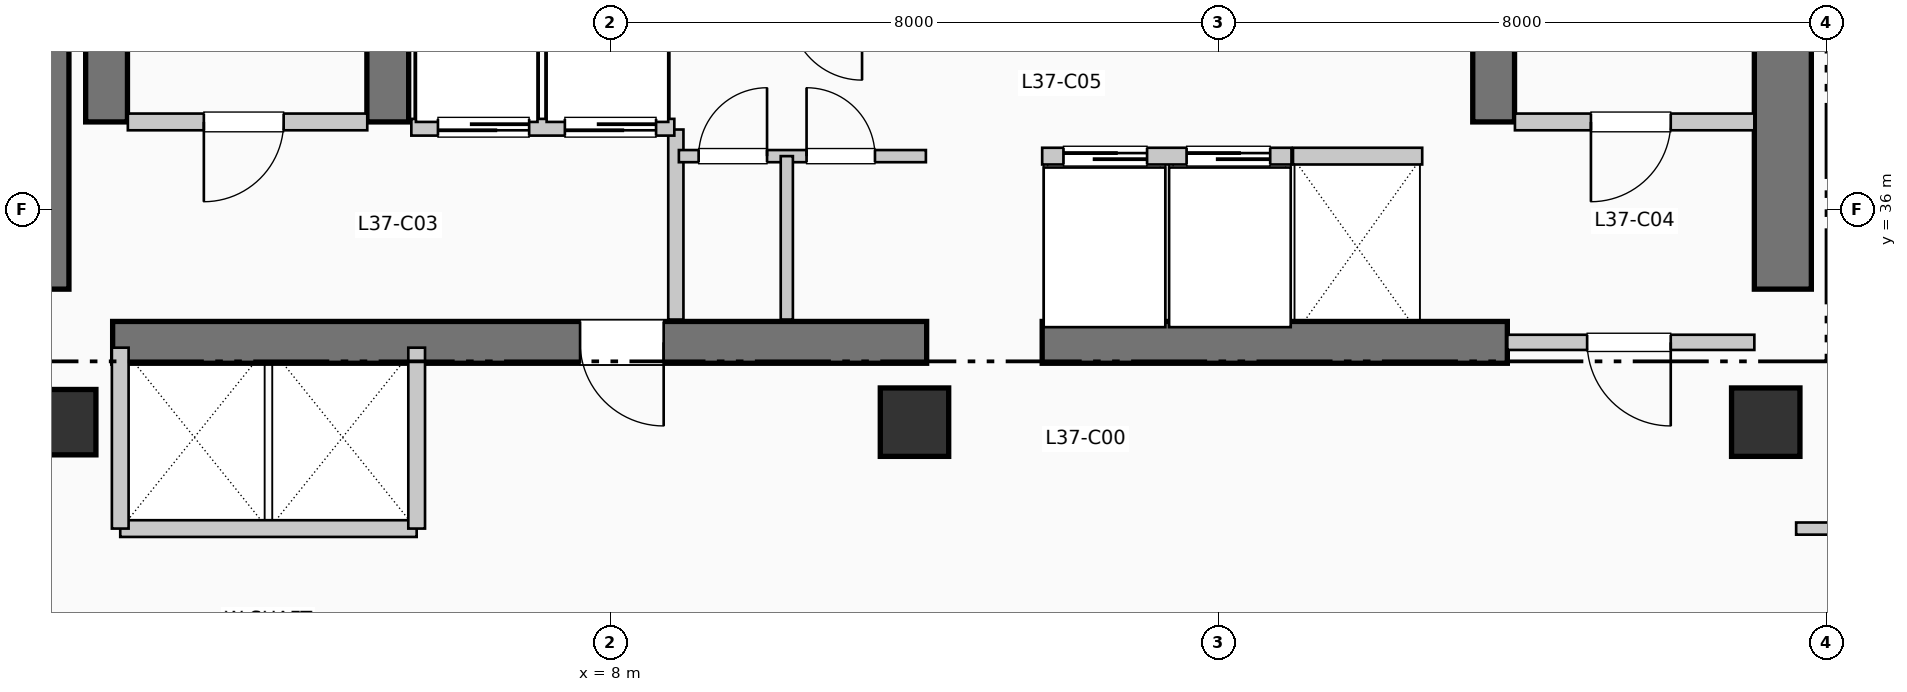
"""IFC4 building model, lengths in metres.
Left out: names, types, materials, properties, quantities, classifications, styles, units other than length and angle.
Written with IfcOpenShell. Run it as: python <this file> out.ifc"""

import sys

from ifc_helpers import new_model, si_unit, direction, frame, frame_2d, origin, origin_2d, place, context, subcontext, project, spatial, rectangle, extrude, element, fill, save


model = new_model("IFC4")
c1 = context("Model", 3, precision=1e-05, world=origin(), true_north=direction((0.0, 1.0)))
c2 = subcontext(c1, "Body", "Model", "MODEL_VIEW")
j1 = project(units=[si_unit("LENGTHUNIT", "METRE"), si_unit("PLANEANGLEUNIT", "RADIAN")], contexts=[c1])
p1 = place(None, origin())
s1 = spatial("IfcSite", under=j1, at=p1, CompositionType="ELEMENT")
p2 = place(p1, origin())
s2 = spatial("IfcBuilding", under=s1, at=p2, CompositionType="ELEMENT")
p3 = place(p2, frame((0.0, 0.0, 154.77)))
s3 = spatial("IfcBuildingStorey", under=s2, at=p3, CompositionType="ELEMENT", Elevation=154.77)
p4 = place(p3, frame((0.5, 34.95, 0.0), z_axis=(0.0, 0.0, 1.0), x_axis=(0.0, 1.0, 0.0)))
e1 = element("IfcWall", 1, at=p4, inside=s3, PredefinedType="SHEAR", context=c2, shape_type="SweptSolid", body=[
    extrude(rectangle(XDim=7.9, YDim=0.75, at=frame_2d((3.95, 0.0))), origin(), (0.0, 0.0, 1.0), 3.96),
])
p5 = place(p3, frame((23.425, 34.95, 0.0), z_axis=(0.0, 0.0, 1.0), x_axis=(0.0, 1.0, 0.0)))
e2 = element("IfcWall", 2, at=p5, inside=s3, PredefinedType="SHEAR", context=c2, shape_type="SweptSolid", body=[
    extrude(rectangle(XDim=10.64, YDim=0.75, at=frame_2d((5.32, 0.0))), origin(), (0.0, 0.0, 1.0), 3.96),
])
p6 = place(p3, frame((1.45, 34.25, 0.0), z_axis=(0.0, 0.0, 1.0), x_axis=(1.0, 0.0, 0.0)))
e3 = element("IfcWall", 3, at=p6, inside=s3, PredefinedType="SHEAR", context=c2, shape_type="SweptSolid", body=[
    extrude(rectangle(XDim=10.71, YDim=0.55, at=frame_2d((5.355, 0.0))), origin(), (0.0, 0.0, 1.0), 3.96),
])
p7 = place(p6, frame((7.25, 0.0, 0.0), z_axis=(0.0, 0.0, 1.0), x_axis=(-1.0, 0.0, 0.0)))
e4 = element("IfcOpeningElement", 4, at=p7, cuts=e3, PredefinedType="OPENING", context=c2, shape_type="SweptSolid", body=[
    extrude(rectangle(XDim=1.1, YDim=2.15, at=frame_2d((0.55, 1.075))), frame((0.0, 0.285, 0.0), z_axis=(0.0, -1.0, 0.0), x_axis=(1.0, 0.0, 0.0)), (0.0, 0.0, 1.0), 0.57),
])
p8 = place(p3, frame((13.68, 34.25, 0.0), z_axis=(0.0, 0.0, 1.0), x_axis=(1.0, 0.0, 0.0)))
e5 = element("IfcWall", 5, at=p8, inside=s3, PredefinedType="SHEAR", context=c2, shape_type="SweptSolid", body=[
    extrude(rectangle(XDim=6.12, YDim=0.55, at=frame_2d((3.06, 0.0))), origin(), (0.0, 0.0, 1.0), 3.96),
])
for number, where, z_axis, x_axis in (
    (6, (1.37, 37.15, 0.0), (0.0, 0.0, 1.0), (0.0, 1.0, 0.0)),
    (7, (5.07, 37.15, 0.0), (0.0, 0.0, 1.0), (0.0, 1.0, 0.0)),
    (8, (19.62, 37.15, 0.0), (0.0, 0.0, 1.0), (0.0, 1.0, 0.0)),
):
    element("IfcWall", number, at=place(p3, frame(where, z_axis=z_axis, x_axis=x_axis)), inside=s3, PredefinedType="SHEAR", context=c2, shape_type="SweptSolid", body=[
        extrude(rectangle(XDim=7.89, YDim=0.55, at=frame_2d((3.945, 0.0))), origin(), (0.0, 0.0, 1.0), 3.96),
    ])
p9 = place(p3, frame((0.8, 33.2, 0.0), z_axis=(0.0, 0.0, 1.0), x_axis=(1.0, 0.0, 0.0)))
e9 = element("IfcColumn", 9, at=p9, inside=s3, PredefinedType="COLUMN", context=c2, shape_type="SweptSolid", body=[
    extrude(rectangle(XDim=0.86, YDim=0.86, at=origin_2d()), origin(), (0.0, 0.0, 1.0), 3.96),
])
for number, where, z_axis, x_axis in (
    (10, (12.0, 33.2, 0.0), (0.0, 0.0, 1.0), (1.0, 0.0, 0.0)),
    (11, (23.2, 33.2, 0.0), (0.0, 0.0, 1.0), (1.0, 0.0, 0.0)),
):
    element("IfcColumn", number, at=place(p3, frame(where, z_axis=z_axis, x_axis=x_axis)), inside=s3, PredefinedType="COLUMN", context=c2, shape_type="SweptSolid", body=[
        extrude(rectangle(XDim=0.9, YDim=0.9, at=origin_2d()), origin(), (0.0, 0.0, 1.0), 3.96),
    ])
p10 = place(p3, frame((1.65, 37.15, 0.0), z_axis=(0.0, 0.0, 1.0), x_axis=(1.0, 0.0, 0.0)))
e12 = element("IfcWall", 12, at=p10, inside=s3, PredefinedType="PARTITIONING", context=c2, shape_type="SweptSolid", body=[
    extrude(rectangle(XDim=3.15, YDim=0.22, at=frame_2d((1.575, 0.0))), origin(), (0.0, 0.0, 1.0), 3.71),
])
p11 = place(p10, frame((2.05, 0.0, 0.0), z_axis=(0.0, 0.0, 1.0), x_axis=(-1.0, 0.0, 0.0)))
e13 = element("IfcOpeningElement", 13, at=p11, cuts=e12, PredefinedType="OPENING", context=c2, shape_type="SweptSolid", body=[
    extrude(rectangle(XDim=1.05, YDim=2.15, at=frame_2d((0.525, 1.075))), frame((0.0, 0.12, 0.0), z_axis=(0.0, -1.0, 0.0), x_axis=(1.0, 0.0, 0.0)), (0.0, 0.0, 1.0), 0.24),
])
p12 = place(p3, frame((8.86, 34.55, 0.0), z_axis=(0.0, 0.0, 1.0), x_axis=(0.0, 1.0, 0.0)))
e14 = element("IfcWall", 14, at=p12, inside=s3, PredefinedType="PARTITIONING", context=c2, shape_type="SweptSolid", body=[
    extrude(rectangle(XDim=2.5, YDim=0.2, at=frame_2d((1.25, 0.0))), origin(), (0.0, 0.0, 1.0), 3.71),
])
p13 = place(p3, frame((19.9, 37.15, 0.0), z_axis=(0.0, 0.0, 1.0), x_axis=(1.0, 0.0, 0.0)))
e15 = element("IfcWall", 15, at=p13, inside=s3, PredefinedType="PARTITIONING", context=c2, shape_type="SweptSolid", body=[
    extrude(rectangle(XDim=3.15, YDim=0.22, at=frame_2d((1.575, 0.0))), origin(), (0.0, 0.0, 1.0), 3.71),
])
p14 = place(p13, frame((2.05, 0.0, 0.0), z_axis=(0.0, 0.0, 1.0), x_axis=(-1.0, 0.0, 0.0)))
e16 = element("IfcOpeningElement", 16, at=p14, cuts=e15, PredefinedType="OPENING", context=c2, shape_type="SweptSolid", body=[
    extrude(rectangle(XDim=1.05, YDim=2.15, at=frame_2d((0.525, 1.075))), frame((0.0, 0.12, 0.0), z_axis=(0.0, -1.0, 0.0), x_axis=(1.0, 0.0, 0.0)), (0.0, 0.0, 1.0), 0.24),
])
p15 = place(p3, frame((19.8, 34.25, 0.0), z_axis=(0.0, 0.0, 1.0), x_axis=(1.0, 0.0, 0.0)))
e17 = element("IfcWall", 17, at=p15, inside=s3, PredefinedType="PARTITIONING", context=c2, shape_type="SweptSolid", body=[
    extrude(rectangle(XDim=3.25, YDim=0.2, at=frame_2d((1.625, 0.0))), origin(), (0.0, 0.0, 1.0), 3.71),
])
p16 = place(p15, frame((2.15, 0.0, 0.0), z_axis=(0.0, 0.0, 1.0), x_axis=(-1.0, 0.0, 0.0)))
e18 = element("IfcOpeningElement", 18, at=p16, cuts=e17, PredefinedType="OPENING", context=c2, shape_type="SweptSolid", body=[
    extrude(rectangle(XDim=1.1, YDim=2.15, at=frame_2d((0.55, 1.075))), frame((0.0, 0.11, 0.0), z_axis=(0.0, -1.0, 0.0), x_axis=(1.0, 0.0, 0.0)), (0.0, 0.0, 1.0), 0.22),
])
p17 = place(p3, frame((5.38, 37.08, 0.0), z_axis=(0.0, 0.0, 1.0), x_axis=(1.0, 0.0, 0.0)))
e19 = element("IfcWall", 19, at=p17, inside=s3, PredefinedType="PARTITIONING", context=c2, shape_type="SweptSolid", body=[
    extrude(rectangle(XDim=3.46, YDim=0.22, at=frame_2d((1.73, 0.0))), origin(), (0.0, 0.0, 1.0), 3.71),
])
p18 = place(p17, frame((1.55, 0.0, 0.0), z_axis=(0.0, 0.0, 1.0), x_axis=(-1.0, 0.0, 0.0)))
e20 = element("IfcOpeningElement", 20, at=p18, cuts=e19, PredefinedType="OPENING", context=c2, shape_type="SweptSolid", body=[
    extrude(rectangle(XDim=1.2, YDim=2.2, at=frame_2d((0.6, 1.1))), frame((0.0, 0.12, 0.0), z_axis=(0.0, -1.0, 0.0), x_axis=(1.0, 0.0, 0.0)), (0.0, 0.0, 1.0), 0.24),
])
p19 = place(p17, frame((3.22, 0.0, 0.0), z_axis=(0.0, 0.0, 1.0), x_axis=(-1.0, 0.0, 0.0)))
e21 = element("IfcOpeningElement", 21, at=p19, cuts=e19, PredefinedType="OPENING", context=c2, shape_type="SweptSolid", body=[
    extrude(rectangle(XDim=1.2, YDim=2.2, at=frame_2d((0.6, 1.1))), frame((0.0, 0.12, 0.0), z_axis=(0.0, -1.0, 0.0), x_axis=(1.0, 0.0, 0.0)), (0.0, 0.0, 1.0), 0.24),
])
p20 = place(p3, frame((1.55, 31.8, 0.0), z_axis=(0.0, 0.0, 1.0), x_axis=(1.0, 0.0, 0.0)))
e22 = element("IfcWall", 22, at=p20, inside=s3, PredefinedType="PARTITIONING", context=c2, shape_type="SweptSolid", body=[
    extrude(rectangle(XDim=3.9, YDim=0.22, at=frame_2d((1.95, 0.0))), origin(), (0.0, 0.0, 1.0), 3.71),
])
for number, where, z_axis, x_axis in (
    (23, (1.55, 31.8, 0.0), (0.0, 0.0, 1.0), (0.0, 1.0, 0.0)),
    (24, (5.45, 31.8, 0.0), (0.0, 0.0, 1.0), (0.0, 1.0, 0.0)),
):
    element("IfcWall", number, at=place(p3, frame(where, z_axis=z_axis, x_axis=x_axis)), inside=s3, PredefinedType="PARTITIONING", context=c2, shape_type="SweptSolid", body=[
        extrude(rectangle(XDim=2.38, YDim=0.22, at=frame_2d((1.19, 0.0))), origin(), (0.0, 0.0, 1.0), 3.71),
    ])
p21 = place(p3, frame((8.9, 36.7, 0.0), z_axis=(0.0, 0.0, 1.0), x_axis=(1.0, 0.0, 0.0)))
e25 = element("IfcWall", 25, at=p21, inside=s3, PredefinedType="PARTITIONING", context=c2, shape_type="SweptSolid", body=[
    extrude(rectangle(XDim=3.25, YDim=0.16, at=frame_2d((1.625, 0.0))), origin(), (0.0, 0.0, 1.0), 3.71),
])
p22 = place(p21, frame((0.26, 0.0, 0.0)))
e26 = element("IfcOpeningElement", 26, at=p22, cuts=e25, PredefinedType="OPENING", context=c2, shape_type="SweptSolid", body=[
    extrude(rectangle(XDim=0.9, YDim=2.15, at=frame_2d((0.45, 1.075))), frame((0.0, 0.09, 0.0), z_axis=(0.0, -1.0, 0.0), x_axis=(1.0, 0.0, 0.0)), (0.0, 0.0, 1.0), 0.18),
])
p23 = place(p21, frame((1.68, 0.0, 0.0)))
e27 = element("IfcOpeningElement", 27, at=p23, cuts=e25, PredefinedType="OPENING", context=c2, shape_type="SweptSolid", body=[
    extrude(rectangle(XDim=0.9, YDim=2.15, at=frame_2d((0.45, 1.075))), frame((0.0, 0.09, 0.0), z_axis=(0.0, -1.0, 0.0), x_axis=(1.0, 0.0, 0.0)), (0.0, 0.0, 1.0), 0.18),
])
p24 = place(p3, frame((10.32, 34.55, 0.0), z_axis=(0.0, 0.0, 1.0), x_axis=(0.0, 1.0, 0.0)))
e28 = element("IfcWall", 28, at=p24, inside=s3, PredefinedType="PARTITIONING", context=c2, shape_type="SweptSolid", body=[
    extrude(rectangle(XDim=2.15, YDim=0.16, at=frame_2d((1.075, 0.0))), origin(), (0.0, 0.0, 1.0), 3.71),
])
p25 = place(p3, frame((13.68, 36.7, 0.0), z_axis=(0.0, 0.0, 1.0), x_axis=(1.0, 0.0, 0.0)))
e29 = element("IfcWall", 29, at=p25, inside=s3, PredefinedType="PARTITIONING", context=c2, shape_type="SweptSolid", body=[
    extrude(rectangle(XDim=3.28, YDim=0.22, at=frame_2d((1.64, 0.0))), origin(), (0.0, 0.0, 1.0), 3.71),
])
p26 = place(p25, frame((0.28, 0.0, 0.0)))
e30 = element("IfcOpeningElement", 30, at=p26, cuts=e29, PredefinedType="OPENING", context=c2, shape_type="SweptSolid", body=[
    extrude(rectangle(XDim=1.1, YDim=2.2, at=frame_2d((0.55, 1.1))), frame((0.0, 0.12, 0.0), z_axis=(0.0, -1.0, 0.0), x_axis=(1.0, 0.0, 0.0)), (0.0, 0.0, 1.0), 0.24),
])
p27 = place(p25, frame((1.9, 0.0, 0.0)))
e31 = element("IfcOpeningElement", 31, at=p27, cuts=e29, PredefinedType="OPENING", context=c2, shape_type="SweptSolid", body=[
    extrude(rectangle(XDim=1.1, YDim=2.2, at=frame_2d((0.55, 1.1))), frame((0.0, 0.12, 0.0), z_axis=(0.0, -1.0, 0.0), x_axis=(1.0, 0.0, 0.0)), (0.0, 0.0, 1.0), 0.24),
])
p28 = place(p3, frame((16.98, 36.7, 0.0), z_axis=(0.0, 0.0, 1.0), x_axis=(1.0, 0.0, 0.0)))
e32 = element("IfcWall", 32, at=p28, inside=s3, PredefinedType="PARTITIONING", context=c2, shape_type="SweptSolid", body=[
    extrude(rectangle(XDim=1.7, YDim=0.22, at=frame_2d((0.85, 0.0))), origin(), (0.0, 0.0, 1.0), 3.71),
])
p29 = place(p3, frame((23.6, 31.8, 0.0), z_axis=(0.0, 0.0, 1.0), x_axis=(1.0, 0.0, 0.0)))
e33 = element("IfcWall", 33, at=p29, inside=s3, PredefinedType="PARTITIONING", context=c2, shape_type="SweptSolid", body=[
    extrude(rectangle(XDim=26.41, YDim=0.16, at=frame_2d((13.205, 0.0))), origin(), (0.0, 0.0, 1.0), 3.71),
])
p30 = place(p29, frame((4.015, 0.0, 0.0)))
e34 = element("IfcOpeningElement", 34, at=p30, cuts=e33, PredefinedType="OPENING", context=c2, shape_type="SweptSolid", body=[
    extrude(rectangle(XDim=0.95, YDim=2.15, at=frame_2d((0.475, 1.075))), frame((0.0, 0.09, 0.0), z_axis=(0.0, -1.0, 0.0), x_axis=(1.0, 0.0, 0.0)), (0.0, 0.0, 1.0), 0.18),
])
p31 = place(p29, frame((12.994, 0.0, 0.0)))
e35 = element("IfcOpeningElement", 35, at=p31, cuts=e33, PredefinedType="OPENING", context=c2, shape_type="SweptSolid", body=[
    extrude(rectangle(XDim=0.95, YDim=2.15, at=frame_2d((0.475, 1.075))), frame((0.0, 0.09, 0.0), z_axis=(0.0, -1.0, 0.0), x_axis=(1.0, 0.0, 0.0)), (0.0, 0.0, 1.0), 0.18),
])
p32 = place(p29, frame((21.709, 0.0, 0.0)))
e36 = element("IfcOpeningElement", 36, at=p32, cuts=e33, PredefinedType="OPENING", context=c2, shape_type="SweptSolid", body=[
    extrude(rectangle(XDim=0.95, YDim=2.15, at=frame_2d((0.475, 1.075))), frame((0.0, 0.09, 0.0), z_axis=(0.0, -1.0, 0.0), x_axis=(1.0, 0.0, 0.0)), (0.0, 0.0, 1.0), 0.18),
])
p33 = place(p11, origin())
e37 = element("IfcDoor", 37, at=p33, inside=s3, OperationType="SINGLE_SWING_LEFT", PredefinedType="DOOR", context=c2, shape_type="SweptSolid", body=[
    extrude(rectangle(XDim=1.05, YDim=2.15, at=frame_2d((0.525, 1.075))), frame((0.0, 0.025, 0.0), z_axis=(0.0, -1.0, 0.0), x_axis=(1.0, 0.0, 0.0)), (0.0, 0.0, 1.0), 0.05),
])
fill(e13, e37)
p34 = place(p7, origin())
e38 = element("IfcDoor", 38, at=p34, inside=s3, OperationType="SINGLE_SWING_RIGHT", PredefinedType="DOOR", context=c2, shape_type="SweptSolid", body=[
    extrude(rectangle(XDim=1.1, YDim=2.15, at=frame_2d((0.55, 1.075))), frame((0.0, 0.025, 0.0), z_axis=(0.0, -1.0, 0.0), x_axis=(1.0, 0.0, 0.0)), (0.0, 0.0, 1.0), 0.05),
])
fill(e4, e38)
p35 = place(p14, origin())
e39 = element("IfcDoor", 39, at=p35, inside=s3, OperationType="SINGLE_SWING_LEFT", PredefinedType="DOOR", context=c2, shape_type="SweptSolid", body=[
    extrude(rectangle(XDim=1.05, YDim=2.15, at=frame_2d((0.525, 1.075))), frame((0.0, 0.025, 0.0), z_axis=(0.0, -1.0, 0.0), x_axis=(1.0, 0.0, 0.0)), (0.0, 0.0, 1.0), 0.05),
])
fill(e16, e39)
p36 = place(p16, origin())
e40 = element("IfcDoor", 40, at=p36, inside=s3, OperationType="SINGLE_SWING_RIGHT", PredefinedType="DOOR", context=c2, shape_type="SweptSolid", body=[
    extrude(rectangle(XDim=1.1, YDim=2.15, at=frame_2d((0.55, 1.075))), frame((0.0, 0.025, 0.0), z_axis=(0.0, -1.0, 0.0), x_axis=(1.0, 0.0, 0.0)), (0.0, 0.0, 1.0), 0.05),
])
fill(e18, e40)
p37 = place(p18, origin())
e41 = element("IfcDoor", 41, at=p37, inside=s3, OperationType="SLIDING_TO_RIGHT", PredefinedType="DOOR", context=c2, shape_type="SweptSolid", body=[
    extrude(rectangle(XDim=1.2, YDim=2.2, at=frame_2d((0.6, 1.1))), frame((0.0, 0.025, 0.0), z_axis=(0.0, -1.0, 0.0), x_axis=(1.0, 0.0, 0.0)), (0.0, 0.0, 1.0), 0.05),
])
fill(e20, e41)
p38 = place(p19, origin())
e42 = element("IfcDoor", 42, at=p38, inside=s3, OperationType="SLIDING_TO_RIGHT", PredefinedType="DOOR", context=c2, shape_type="SweptSolid", body=[
    extrude(rectangle(XDim=1.2, YDim=2.2, at=frame_2d((0.6, 1.1))), frame((0.0, 0.025, 0.0), z_axis=(0.0, -1.0, 0.0), x_axis=(1.0, 0.0, 0.0)), (0.0, 0.0, 1.0), 0.05),
])
fill(e21, e42)
p39 = place(p22, origin())
e43 = element("IfcDoor", 43, at=p39, inside=s3, OperationType="SINGLE_SWING_RIGHT", PredefinedType="DOOR", context=c2, shape_type="SweptSolid", body=[
    extrude(rectangle(XDim=0.9, YDim=2.15, at=frame_2d((0.45, 1.075))), frame((0.0, 0.025, 0.0), z_axis=(0.0, -1.0, 0.0), x_axis=(1.0, 0.0, 0.0)), (0.0, 0.0, 1.0), 0.05),
])
fill(e26, e43)
p40 = place(p23, origin())
e44 = element("IfcDoor", 44, at=p40, inside=s3, OperationType="SINGLE_SWING_LEFT", PredefinedType="DOOR", context=c2, shape_type="SweptSolid", body=[
    extrude(rectangle(XDim=0.9, YDim=2.15, at=frame_2d((0.45, 1.075))), frame((0.0, 0.025, 0.0), z_axis=(0.0, -1.0, 0.0), x_axis=(1.0, 0.0, 0.0)), (0.0, 0.0, 1.0), 0.05),
])
fill(e27, e44)
p41 = place(p26, origin())
e45 = element("IfcDoor", 45, at=p41, inside=s3, OperationType="SLIDING_TO_RIGHT", PredefinedType="DOOR", context=c2, shape_type="SweptSolid", body=[
    extrude(rectangle(XDim=1.1, YDim=2.2, at=frame_2d((0.55, 1.1))), frame((0.0, 0.025, 0.0), z_axis=(0.0, -1.0, 0.0), x_axis=(1.0, 0.0, 0.0)), (0.0, 0.0, 1.0), 0.05),
])
fill(e30, e45)
p42 = place(p27, origin())
e46 = element("IfcDoor", 46, at=p42, inside=s3, OperationType="SLIDING_TO_RIGHT", PredefinedType="DOOR", context=c2, shape_type="SweptSolid", body=[
    extrude(rectangle(XDim=1.1, YDim=2.2, at=frame_2d((0.55, 1.1))), frame((0.0, 0.025, 0.0), z_axis=(0.0, -1.0, 0.0), x_axis=(1.0, 0.0, 0.0)), (0.0, 0.0, 1.0), 0.05),
])
fill(e31, e46)
save(model, sys.argv[1])
